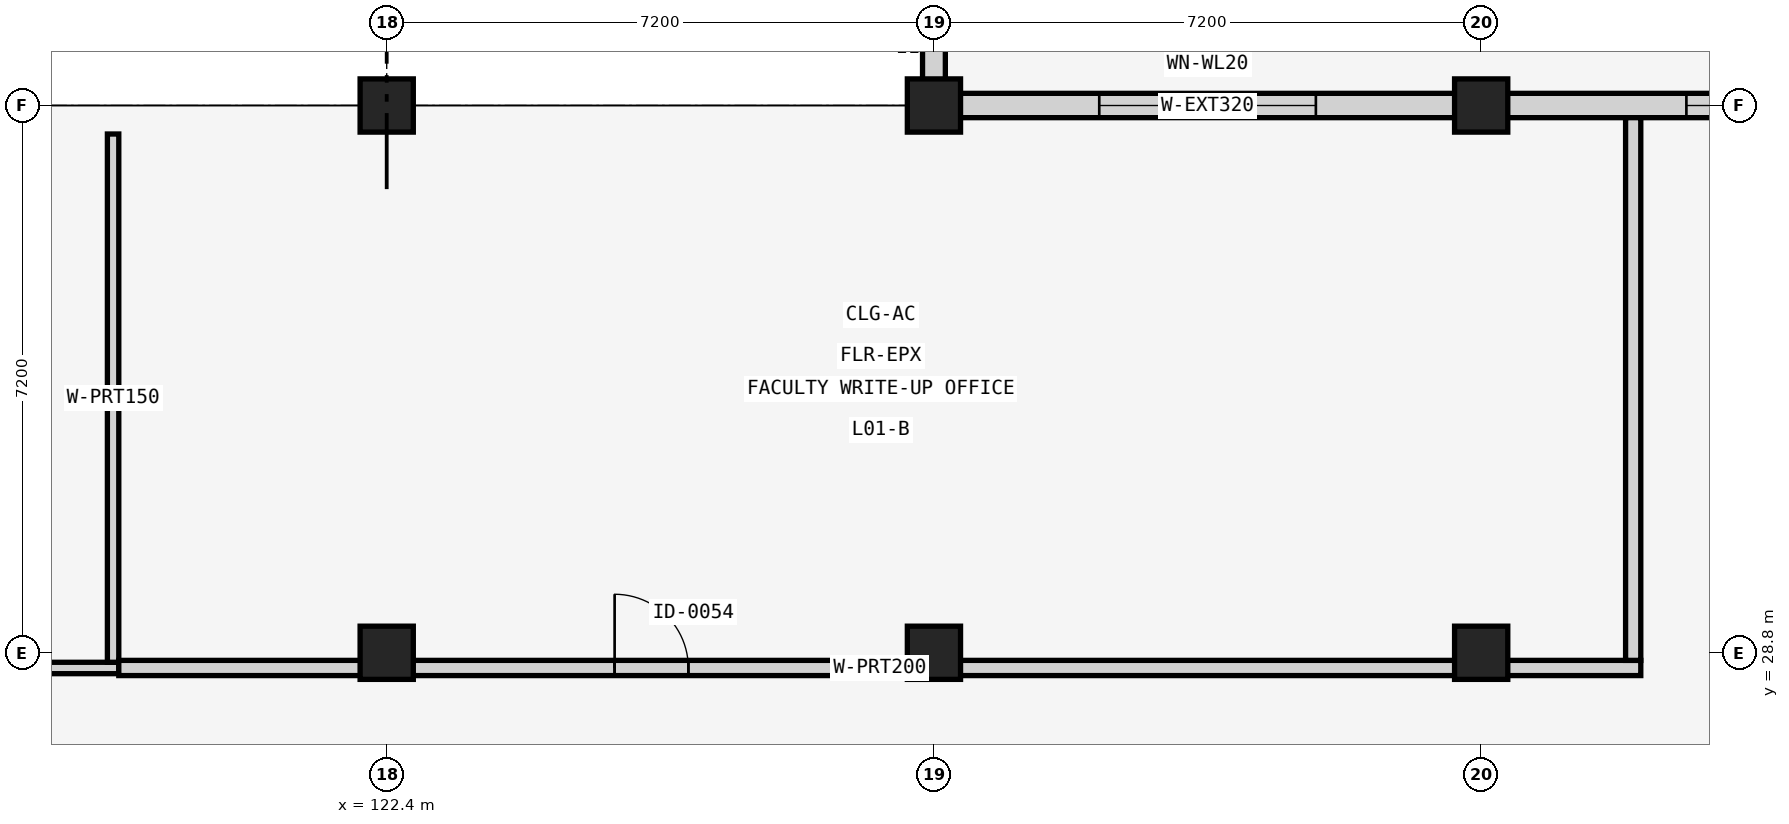
"""IFC4 building model, lengths in metres.
Left out: names, types, materials, properties, quantities, classifications, styles, units other than length and angle.
Written with IfcOpenShell. Run it as: python <this file> out.ifc"""

import sys

from ifc_helpers import new_model, si_unit, direction, frame, frame_2d, origin, origin_2d, place, context, subcontext, project, spatial, rectangle, extrude, element, fill, save


model = new_model("IFC4")
c1 = context("Model", 3, precision=1e-05, world=origin(), true_north=direction((0.0, 1.0)))
c2 = subcontext(c1, "Body", "Model", "MODEL_VIEW")
j1 = project(units=[si_unit("LENGTHUNIT", "METRE"), si_unit("PLANEANGLEUNIT", "RADIAN")], contexts=[c1])
p1 = place(None, origin())
s1 = spatial("IfcSite", under=j1, at=p1, CompositionType="ELEMENT")
p2 = place(p1, origin())
s2 = spatial("IfcBuilding", under=s1, at=p2, CompositionType="ELEMENT")
p3 = place(p2, frame((0.0, 0.0, 4.8)))
s3 = spatial("IfcBuildingStorey", under=s2, at=p3, CompositionType="ELEMENT", Elevation=4.8)
for number, where, z_axis, x_axis in (
    (1, (122.4, 28.8, 0.0), (0.0, 0.0, 1.0), (1.0, 0.0, 0.0)),
    (2, (122.4, 36.0, 0.0), (0.0, 0.0, 1.0), (1.0, 0.0, 0.0)),
    (3, (129.6, 28.8, 0.0), (0.0, 0.0, 1.0), (1.0, 0.0, 0.0)),
    (4, (129.6, 36.0, 0.0), (0.0, 0.0, 1.0), (1.0, 0.0, 0.0)),
    (5, (136.8, 28.8, 0.0), (0.0, 0.0, 1.0), (1.0, 0.0, 0.0)),
    (6, (136.8, 36.0, 0.0), (0.0, 0.0, 1.0), (1.0, 0.0, 0.0)),
):
    element("IfcColumn", number, at=place(p3, frame(where, z_axis=z_axis, x_axis=x_axis)), inside=s3, PredefinedType="COLUMN", context=c2, shape_type="SweptSolid", body=[
        extrude(rectangle(XDim=0.7, YDim=0.7, at=origin_2d()), origin(), (0.0, 0.0, 1.0), 4.16),
    ])
p4 = place(p3, frame((129.6, 36.34, 0.0), z_axis=(0.0, 0.0, 1.0), x_axis=(0.0, 1.0, 0.0)))
e7 = element("IfcWall", 7, at=p4, inside=s3, PredefinedType="SOLIDWALL", context=c2, shape_type="SweptSolid", body=[
    extrude(rectangle(XDim=6.52, YDim=0.3, at=frame_2d((3.26, 0.0))), origin(), (0.0, 0.0, 1.0), 3.11),
])
p5 = place(p4, frame((1.76, 0.0, 0.95)))
e8 = element("IfcOpeningElement", 8, at=p5, cuts=e7, PredefinedType="OPENING", context=c2, shape_type="SweptSolid", body=[
    extrude(rectangle(XDim=3.0, YDim=1.8, at=frame_2d((1.5, 0.9))), frame((0.0, 0.16, 0.0), z_axis=(0.0, -1.0, 0.0), x_axis=(1.0, 0.0, 0.0)), (0.0, 0.0, 1.0), 0.32),
])
p6 = place(p3, frame((129.94, 36.0, 0.0), z_axis=(0.0, 0.0, 1.0), x_axis=(1.0, 0.0, 0.0)))
e9 = element("IfcWall", 9, at=p6, inside=s3, PredefinedType="SOLIDWALL", context=c2, shape_type="SweptSolid", body=[
    extrude(rectangle(XDim=6.52, YDim=0.32, at=frame_2d((3.26, 0.0))), origin(), (0.0, 0.0, 1.0), 3.11),
])
p7 = place(p6, frame((1.835, 0.0, 0.95)))
e10 = element("IfcOpeningElement", 10, at=p7, cuts=e9, PredefinedType="OPENING", context=c2, shape_type="SweptSolid", body=[
    extrude(rectangle(XDim=2.85, YDim=1.95, at=frame_2d((1.425, 0.975))), frame((0.0, 0.17, 0.0), z_axis=(0.0, -1.0, 0.0), x_axis=(1.0, 0.0, 0.0)), (0.0, 0.0, 1.0), 0.34),
])
p8 = place(p3, frame((137.14, 36.0, 0.0), z_axis=(0.0, 0.0, 1.0), x_axis=(1.0, 0.0, 0.0)))
e11 = element("IfcWall", 11, at=p8, inside=s3, PredefinedType="SOLIDWALL", context=c2, shape_type="SweptSolid", body=[
    extrude(rectangle(XDim=6.52, YDim=0.32, at=frame_2d((3.26, 0.0))), origin(), (0.0, 0.0, 1.0), 3.11),
])
p9 = place(p8, frame((2.36, 0.0, 0.85)))
e12 = element("IfcOpeningElement", 12, at=p9, cuts=e11, PredefinedType="OPENING", context=c2, shape_type="SweptSolid", body=[
    extrude(rectangle(XDim=1.8, YDim=2.1, at=frame_2d((0.9, 1.05))), frame((0.0, 0.17, 0.0), z_axis=(0.0, -1.0, 0.0), x_axis=(1.0, 0.0, 0.0)), (0.0, 0.0, 1.0), 0.34),
])
p10 = place(p3, frame((100.98, 28.6, 0.0), z_axis=(0.0, 0.0, 1.0), x_axis=(1.0, 0.0, 0.0)))
e13 = element("IfcWall", 13, at=p10, inside=s3, PredefinedType="PARTITIONING", context=c2, shape_type="SweptSolid", body=[
    extrude(rectangle(XDim=17.895, YDim=0.15, at=frame_2d((8.948, 0.0))), origin(), (0.0, 0.0, 1.0), 3.11),
])
p11 = place(p10, frame((8.492, 0.0, 0.0)))
e14 = element("IfcOpeningElement", 14, at=p11, cuts=e13, PredefinedType="OPENING", context=c2, shape_type="SweptSolid", body=[
    extrude(rectangle(XDim=0.91, YDim=2.08, at=frame_2d((0.455, 1.04))), frame((0.0, 0.085, 0.0), z_axis=(0.0, -1.0, 0.0), x_axis=(1.0, 0.0, 0.0)), (0.0, 0.0, 1.0), 0.17),
])
p12 = place(p3, frame((118.8, 28.675, 0.0), z_axis=(0.0, 0.0, 1.0), x_axis=(0.0, 1.0, 0.0)))
e15 = element("IfcWall", 15, at=p12, inside=s3, PredefinedType="PARTITIONING", context=c2, shape_type="SweptSolid", body=[
    extrude(rectangle(XDim=6.95, YDim=0.15, at=frame_2d((3.475, 0.0))), origin(), (0.0, 0.0, 1.0), 3.11),
])
p13 = place(p3, frame((118.875, 28.6, 0.0), z_axis=(0.0, 0.0, 1.0), x_axis=(1.0, 0.0, 0.0)))
e16 = element("IfcWall", 16, at=p13, inside=s3, PredefinedType="PARTITIONING", context=c2, shape_type="SweptSolid", body=[
    extrude(rectangle(XDim=20.025, YDim=0.2, at=frame_2d((10.012, 0.0))), origin(), (0.0, 0.0, 1.0), 3.11),
])
p14 = place(p13, frame((6.524, 0.0, 0.0)))
e17 = element("IfcOpeningElement", 17, at=p14, cuts=e16, PredefinedType="OPENING", context=c2, shape_type="SweptSolid", body=[
    extrude(rectangle(XDim=0.97, YDim=2.08, at=frame_2d((0.485, 1.04))), frame((0.0, 0.11, 0.0), z_axis=(0.0, -1.0, 0.0), x_axis=(1.0, 0.0, 0.0)), (0.0, 0.0, 1.0), 0.22),
])
p15 = place(p3, frame((138.8, 28.7, 0.0), z_axis=(0.0, 0.0, 1.0), x_axis=(0.0, 1.0, 0.0)))
e18 = element("IfcWall", 18, at=p15, inside=s3, PredefinedType="PARTITIONING", context=c2, shape_type="SweptSolid", body=[
    extrude(rectangle(XDim=7.14, YDim=0.2, at=frame_2d((3.57, 0.0))), origin(), (0.0, 0.0, 1.0), 3.11),
])
p16 = place(p7, origin())
e19 = element("IfcWindow", 19, at=p16, inside=s3, PartitioningType="SINGLE_PANEL", PredefinedType="WINDOW", context=c2, shape_type="SweptSolid", body=[
    extrude(rectangle(XDim=2.85, YDim=1.95, at=frame_2d((1.425, 0.975))), frame((0.0, 0.03, 0.0), z_axis=(0.0, -1.0, 0.0), x_axis=(1.0, 0.0, 0.0)), (0.0, 0.0, 1.0), 0.06),
])
fill(e10, e19)
p17 = place(p9, origin())
e20 = element("IfcWindow", 20, at=p17, inside=s3, PartitioningType="SINGLE_PANEL", PredefinedType="WINDOW", context=c2, shape_type="SweptSolid", body=[
    extrude(rectangle(XDim=1.8, YDim=2.1, at=frame_2d((0.9, 1.05))), frame((0.0, 0.03, 0.0), z_axis=(0.0, -1.0, 0.0), x_axis=(1.0, 0.0, 0.0)), (0.0, 0.0, 1.0), 0.06),
])
fill(e12, e20)
p18 = place(p14, origin())
e21 = element("IfcDoor", 21, at=p18, inside=s3, OperationType="SINGLE_SWING_LEFT", PredefinedType="DOOR", context=c2, shape_type="SweptSolid", body=[
    extrude(rectangle(XDim=0.97, YDim=2.08, at=frame_2d((0.485, 1.04))), frame((0.0, 0.025, 0.0), z_axis=(0.0, -1.0, 0.0), x_axis=(1.0, 0.0, 0.0)), (0.0, 0.0, 1.0), 0.05),
])
fill(e17, e21)
save(model, sys.argv[1])
